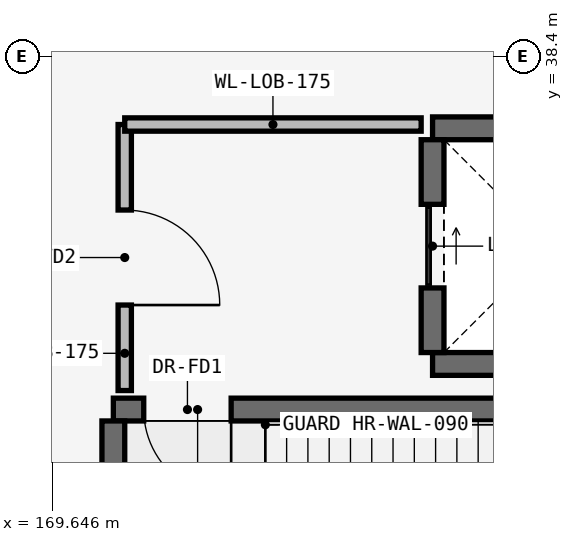
"""IFC4 building model, lengths in metres.
Left out: names, types, materials, properties, quantities, classifications, styles, units other than length and angle.
Written with IfcOpenShell. Run it as: python <this file> out.ifc"""

import sys

from ifc_helpers import new_model, si_unit, direction, frame, frame_2d, origin, place, context, subcontext, project, spatial, rectangle, extrude, element, fill, save


model = new_model("IFC4")
c1 = context("Model", 3, precision=1e-05, world=origin(), true_north=direction((0.0, 1.0)))
c2 = subcontext(c1, "Body", "Model", "MODEL_VIEW")
j1 = project(units=[si_unit("LENGTHUNIT", "METRE"), si_unit("PLANEANGLEUNIT", "RADIAN")], contexts=[c1])
p1 = place(None, origin())
s1 = spatial("IfcSite", under=j1, at=p1, CompositionType="ELEMENT")
p2 = place(p1, origin())
s2 = spatial("IfcBuilding", under=s1, at=p2, CompositionType="ELEMENT")
p3 = place(p2, frame((0.0, 0.0, 5.4)))
s3 = spatial("IfcBuildingStorey", under=s2, at=p3, CompositionType="ELEMENT", Elevation=5.4)
p4 = place(p3, frame((170.45, 33.75, 0.0), z_axis=(0.0, 0.0, 1.0), x_axis=(1.0, 0.0, 0.0)))
e1 = element("IfcWall", 1, at=p4, inside=s3, PredefinedType="SHEAR", context=c2, shape_type="SweptSolid", body=[
    extrude(rectangle(XDim=7.92, YDim=0.3, at=frame_2d((3.96, 0.0))), origin(), (0.0, 0.0, 1.0), 4.52),
])
p5 = place(p4, frame((0.4, 0.0, 0.0)))
e2 = element("IfcOpeningElement", 2, at=p5, cuts=e1, PredefinedType="OPENING", context=c2, shape_type="SweptSolid", body=[
    extrude(rectangle(XDim=1.15, YDim=2.15, at=frame_2d((0.575, 1.075))), frame((0.0, 0.165, 0.0), z_axis=(0.0, -1.0, 0.0), x_axis=(1.0, 0.0, 0.0)), (0.0, 0.0, 1.0), 0.33),
])
p6 = place(p3, frame((170.45, 29.7, 0.0), z_axis=(0.0, 0.0, 1.0), x_axis=(0.0, 1.0, 0.0)))
e3 = element("IfcWall", 3, at=p6, inside=s3, PredefinedType="SHEAR", context=c2, shape_type="SweptSolid", body=[
    extrude(rectangle(XDim=3.9, YDim=0.3, at=frame_2d((1.95, 0.0))), origin(), (0.0, 0.0, 1.0), 4.52),
])
for number, where, z_axis, x_axis in (
    (4, (174.65, 34.35, 0.0), (0.0, 0.0, 1.0), (1.0, 0.0, 0.0)),
    (5, (174.65, 37.45, 0.0), (0.0, 0.0, 1.0), (1.0, 0.0, 0.0)),
):
    element("IfcWall", number, at=place(p3, frame(where, z_axis=z_axis, x_axis=x_axis)), inside=s3, PredefinedType="SHEAR", context=c2, shape_type="SweptSolid", body=[
        extrude(rectangle(XDim=3.1, YDim=0.3, at=frame_2d((1.55, 0.0))), origin(), (0.0, 0.0, 1.0), 4.52),
    ])
p7 = place(p3, frame((174.65, 34.5, 0.0), z_axis=(0.0, 0.0, 1.0), x_axis=(0.0, 1.0, 0.0)))
e6 = element("IfcWall", 6, at=p7, inside=s3, PredefinedType="SHEAR", context=c2, shape_type="SweptSolid", body=[
    extrude(rectangle(XDim=2.8, YDim=0.3, at=frame_2d((1.4, 0.0))), origin(), (0.0, 0.0, 1.0), 4.52),
])
p8 = place(p7, frame((0.85, 0.0, 0.0)))
e7 = element("IfcOpeningElement", 7, at=p8, cuts=e6, PredefinedType="OPENING", context=c2, shape_type="SweptSolid", body=[
    extrude(rectangle(XDim=1.1, YDim=2.15, at=frame_2d((0.55, 1.075))), frame((0.0, 0.165, 0.0), z_axis=(0.0, -1.0, 0.0), x_axis=(1.0, 0.0, 0.0)), (0.0, 0.0, 1.0), 0.33),
])
p9 = place(p3, frame((170.6, 34.0, 0.0), z_axis=(0.0, 0.0, 1.0), x_axis=(0.0, 1.0, 0.0)))
e8 = element("IfcWall", 8, at=p9, inside=s3, PredefinedType="PARTITIONING", context=c2, shape_type="SweptSolid", body=[
    extrude(rectangle(XDim=3.5, YDim=0.175, at=frame_2d((1.75, 0.0))), origin(), (0.0, 0.0, 1.0), 4.52),
])
p10 = place(p9, frame((1.125, 0.0, 0.0)))
e9 = element("IfcOpeningElement", 9, at=p10, cuts=e8, PredefinedType="OPENING", context=c2, shape_type="SweptSolid", body=[
    extrude(rectangle(XDim=1.25, YDim=2.2, at=frame_2d((0.625, 1.1))), frame((0.0, 0.103, 0.0), z_axis=(0.0, -1.0, 0.0), x_axis=(1.0, 0.0, 0.0)), (0.0, 0.0, 1.0), 0.205),
])
p11 = place(p3, frame((170.6, 37.5, 0.0), z_axis=(0.0, 0.0, 1.0), x_axis=(1.0, 0.0, 0.0)))
e10 = element("IfcWall", 10, at=p11, inside=s3, PredefinedType="PARTITIONING", context=c2, shape_type="SweptSolid", body=[
    extrude(rectangle(XDim=3.9, YDim=0.175, at=frame_2d((1.95, 0.0))), origin(), (0.0, 0.0, 1.0), 4.52),
])
p12 = place(p5, frame((1.15, 0.0, 0.0), z_axis=(0.0, 0.0, 1.0), x_axis=(-1.0, 0.0, 0.0)))
e11 = element("IfcDoor", 11, at=p12, inside=s3, OperationType="SINGLE_SWING_RIGHT", PredefinedType="DOOR", context=c2, shape_type="SweptSolid", body=[
    extrude(rectangle(XDim=1.15, YDim=2.15, at=frame_2d((0.575, 1.075))), frame((0.0, 0.025, 0.0), z_axis=(0.0, -1.0, 0.0), x_axis=(1.0, 0.0, 0.0)), (0.0, 0.0, 1.0), 0.05),
])
fill(e2, e11)
p13 = place(p8, origin())
e12 = element("IfcDoor", 12, at=p13, inside=s3, OperationType="SLIDING_TO_LEFT", PredefinedType="DOOR", context=c2, shape_type="SweptSolid", body=[
    extrude(rectangle(XDim=1.1, YDim=2.15, at=frame_2d((0.55, 1.075))), frame((0.0, 0.025, 0.0), z_axis=(0.0, -1.0, 0.0), x_axis=(1.0, 0.0, 0.0)), (0.0, 0.0, 1.0), 0.05),
])
fill(e7, e12)
p14 = place(p10, frame((1.25, 0.0, 0.0), z_axis=(0.0, 0.0, 1.0), x_axis=(-1.0, 0.0, 0.0)))
e13 = element("IfcDoor", 13, at=p14, inside=s3, OperationType="SINGLE_SWING_LEFT", PredefinedType="DOOR", context=c2, shape_type="SweptSolid", body=[
    extrude(rectangle(XDim=1.25, YDim=2.2, at=frame_2d((0.625, 1.1))), frame((0.0, 0.025, 0.0), z_axis=(0.0, -1.0, 0.0), x_axis=(1.0, 0.0, 0.0)), (0.0, 0.0, 1.0), 0.05),
])
fill(e9, e13)
save(model, sys.argv[1])
